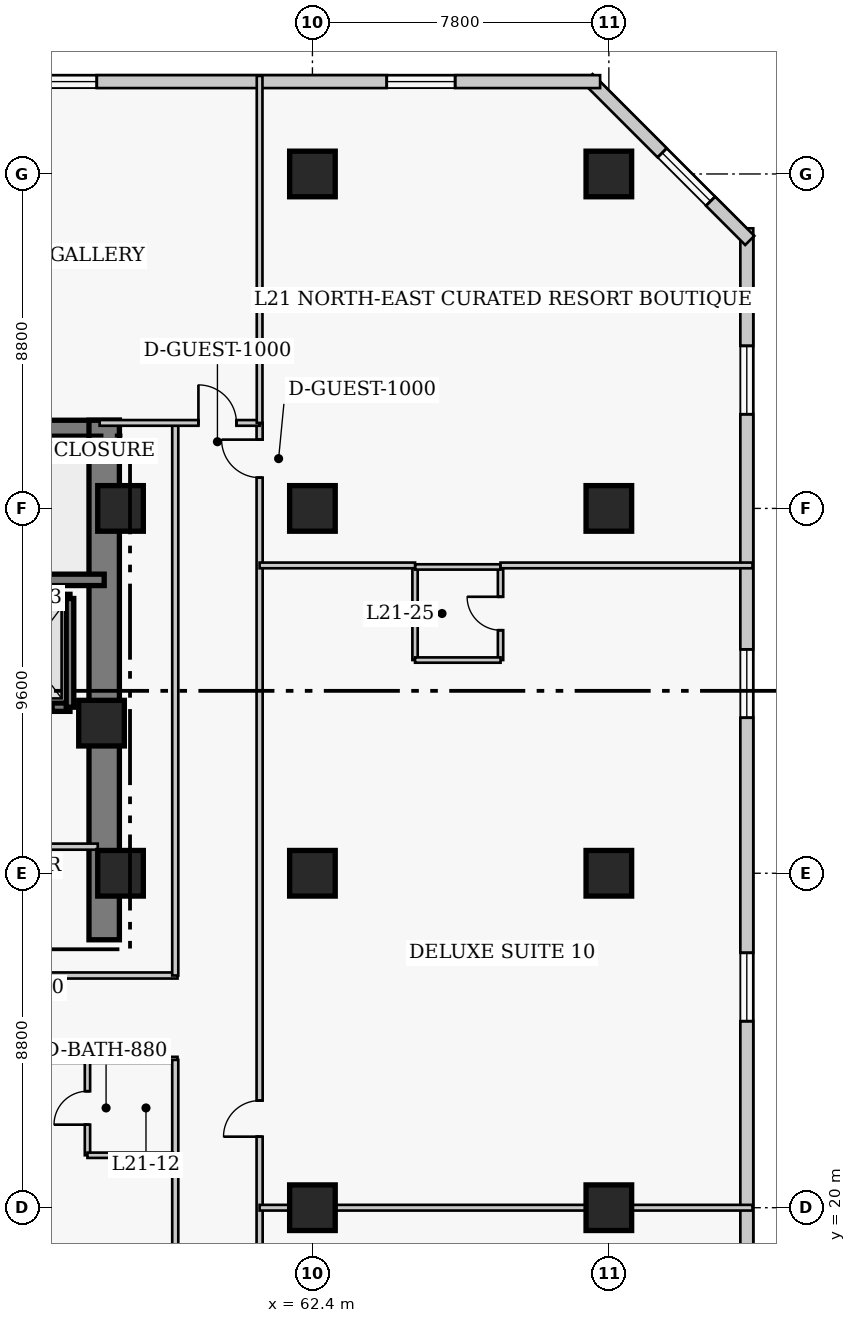
"""IFC4 building model, lengths in metres.
Left out: names, types, materials, properties, quantities, classifications, styles, units other than length and angle.
Written with IfcOpenShell. Run it as: python <this file> out.ifc"""

import sys

from ifc_helpers import new_model, si_unit, direction, frame, frame_2d, origin, origin_2d, place, context, subcontext, project, spatial, rectangle, extrude, element, fill, save


model = new_model("IFC4")
c1 = context("Model", 3, precision=1e-05, world=origin(), true_north=direction((0.0, 1.0)))
c2 = subcontext(c1, "Body", "Model", "MODEL_VIEW")
j1 = project(units=[si_unit("LENGTHUNIT", "METRE"), si_unit("PLANEANGLEUNIT", "RADIAN")], contexts=[c1])
p1 = place(None, origin())
s1 = spatial("IfcSite", under=j1, at=p1, CompositionType="ELEMENT")
p2 = place(p1, origin())
s2 = spatial("IfcBuilding", under=s1, at=p2, CompositionType="ELEMENT")
p3 = place(p2, frame((0.0, 0.0, 88.0)))
s3 = spatial("IfcBuildingStorey", under=s2, at=p3, CompositionType="ELEMENT", Elevation=88.0)
p4 = place(p3, frame((48.45, 40.32, 0.0), z_axis=(0.0, 0.0, 1.0), x_axis=(1.0, 0.0, 0.0)))
e1 = element("IfcWall", 1, at=p4, inside=s3, PredefinedType="SHEAR", context=c2, shape_type="SweptSolid", body=[
    extrude(rectangle(XDim=8.87, YDim=0.8, at=frame_2d((4.435, 0.0))), origin(), (0.0, 0.0, 1.0), 3.8),
])
p5 = place(p3, frame((56.92, 27.05, 0.0), z_axis=(0.0, 0.0, 1.0), x_axis=(0.0, 1.0, 0.0)))
e2 = element("IfcWall", 2, at=p5, inside=s3, PredefinedType="SHEAR", context=c2, shape_type="SweptSolid", body=[
    extrude(rectangle(XDim=13.67, YDim=0.8, at=frame_2d((6.835, 0.0))), origin(), (0.0, 0.0, 1.0), 3.8),
])
p6 = place(p3, frame((48.45, 36.52, 0.0), z_axis=(0.0, 0.0, 1.0), x_axis=(1.0, 0.0, 0.0)))
e3 = element("IfcWall", 3, at=p6, inside=s3, PredefinedType="SHEAR", context=c2, shape_type="SweptSolid", body=[
    extrude(rectangle(XDim=8.47, YDim=0.3, at=frame_2d((4.235, 0.0))), origin(), (0.0, 0.0, 1.0), 3.8),
])
for number, where, z_axis, x_axis in (
    (4, (62.4, 20.0, 0.0), (0.0, 0.0, 1.0), (1.0, 0.0, 0.0)),
    (5, (62.4, 28.8, 0.0), (0.0, 0.0, 1.0), (1.0, 0.0, 0.0)),
    (6, (62.4, 38.4, 0.0), (0.0, 0.0, 1.0), (1.0, 0.0, 0.0)),
    (7, (62.4, 47.2, 0.0), (0.0, 0.0, 1.0), (1.0, 0.0, 0.0)),
    (8, (70.2, 20.0, 0.0), (0.0, 0.0, 1.0), (1.0, 0.0, 0.0)),
    (9, (70.2, 28.8, 0.0), (0.0, 0.0, 1.0), (1.0, 0.0, 0.0)),
    (10, (70.2, 38.4, 0.0), (0.0, 0.0, 1.0), (1.0, 0.0, 0.0)),
    (11, (70.2, 47.2, 0.0), (0.0, 0.0, 1.0), (1.0, 0.0, 0.0)),
    (12, (57.35, 28.8, 0.0), (0.0, 0.0, 1.0), (1.0, 0.0, 0.0)),
    (13, (57.35, 38.4, 0.0), (0.0, 0.0, 1.0), (1.0, 0.0, 0.0)),
    (14, (56.85, 32.75, 0.0), (0.0, 0.0, 1.0), (1.0, 0.0, 0.0)),
):
    element("IfcColumn", number, at=place(p3, frame(where, z_axis=z_axis, x_axis=x_axis)), inside=s3, PredefinedType="COLUMN", context=c2, shape_type="SweptSolid", body=[
        extrude(rectangle(XDim=1.2, YDim=1.2, at=origin_2d()), origin(), (0.0, 0.0, 1.0), 3.8),
    ])
p7 = place(p3, frame((73.83, 13.83, 0.0), z_axis=(0.0, 0.0, 1.0), x_axis=(0.0, 1.0, 0.0)))
e15 = element("IfcWall", 15, at=p7, inside=s3, PredefinedType="SOLIDWALL", context=c2, shape_type="SweptSolid", body=[
    extrude(rectangle(XDim=31.94, YDim=0.34, at=frame_2d((15.97, 0.0))), origin(), (0.0, 0.0, 1.0), 3.54),
])
p8 = place(p7, frame((3.093, 0.0, 0.85)))
e16 = element("IfcOpeningElement", 16, at=p8, cuts=e15, PredefinedType="OPENING", context=c2, shape_type="SweptSolid", body=[
    extrude(rectangle(XDim=1.8, YDim=1.8, at=frame_2d((0.9, 0.9))), frame((0.0, 0.18, 0.0), z_axis=(0.0, -1.0, 0.0), x_axis=(1.0, 0.0, 0.0)), (0.0, 0.0, 1.0), 0.36),
])
p9 = place(p7, frame((11.077, 0.0, 0.85)))
e17 = element("IfcOpeningElement", 17, at=p9, cuts=e15, PredefinedType="OPENING", context=c2, shape_type="SweptSolid", body=[
    extrude(rectangle(XDim=1.8, YDim=1.8, at=frame_2d((0.9, 0.9))), frame((0.0, 0.18, 0.0), z_axis=(0.0, -1.0, 0.0), x_axis=(1.0, 0.0, 0.0)), (0.0, 0.0, 1.0), 0.36),
])
p10 = place(p7, frame((19.062, 0.0, 0.85)))
e18 = element("IfcOpeningElement", 18, at=p10, cuts=e15, PredefinedType="OPENING", context=c2, shape_type="SweptSolid", body=[
    extrude(rectangle(XDim=1.8, YDim=1.8, at=frame_2d((0.9, 0.9))), frame((0.0, 0.18, 0.0), z_axis=(0.0, -1.0, 0.0), x_axis=(1.0, 0.0, 0.0)), (0.0, 0.0, 1.0), 0.36),
])
p11 = place(p7, frame((27.048, 0.0, 0.85)))
e19 = element("IfcOpeningElement", 19, at=p11, cuts=e15, PredefinedType="OPENING", context=c2, shape_type="SweptSolid", body=[
    extrude(rectangle(XDim=1.8, YDim=1.8, at=frame_2d((0.9, 0.9))), frame((0.0, 0.18, 0.0), z_axis=(0.0, -1.0, 0.0), x_axis=(1.0, 0.0, 0.0)), (0.0, 0.0, 1.0), 0.36),
])
p12 = place(p3, frame((73.908, 45.451, 0.0), z_axis=(0.0, 0.0, 1.0), x_axis=(-0.707106781187, 0.707106781187, 0.0)))
e20 = element("IfcWall", 20, at=p12, inside=s3, PredefinedType="SOLIDWALL", context=c2, shape_type="SweptSolid", body=[
    extrude(rectangle(XDim=6.02, YDim=0.34, at=frame_2d((3.01, 0.0))), origin(), (0.0, 0.0, 1.0), 3.54),
])
p13 = place(p12, frame((1.46, 0.0, 0.85)))
e21 = element("IfcOpeningElement", 21, at=p13, cuts=e20, PredefinedType="OPENING", context=c2, shape_type="SweptSolid", body=[
    extrude(rectangle(XDim=1.8, YDim=1.8, at=frame_2d((0.9, 0.9))), frame((0.0, 0.18, 0.0), z_axis=(0.0, -1.0, 0.0), x_axis=(1.0, 0.0, 0.0)), (0.0, 0.0, 1.0), 0.36),
])
p14 = place(p3, frame((69.97, 49.63, 0.0), z_axis=(0.0, 0.0, 1.0), x_axis=(-1.0, 0.0, 0.0)))
e22 = element("IfcWall", 22, at=p14, inside=s3, PredefinedType="SOLIDWALL", context=c2, shape_type="SweptSolid", body=[
    extrude(rectangle(XDim=28.29, YDim=0.34, at=frame_2d((14.145, 0.0))), origin(), (0.0, 0.0, 1.0), 3.54),
])
p15 = place(p14, frame((3.815, 0.0, 0.85)))
e23 = element("IfcOpeningElement", 23, at=p15, cuts=e22, PredefinedType="OPENING", context=c2, shape_type="SweptSolid", body=[
    extrude(rectangle(XDim=1.8, YDim=1.8, at=frame_2d((0.9, 0.9))), frame((0.0, 0.18, 0.0), z_axis=(0.0, -1.0, 0.0), x_axis=(1.0, 0.0, 0.0)), (0.0, 0.0, 1.0), 0.36),
])
p16 = place(p14, frame((13.245, 0.0, 0.85)))
e24 = element("IfcOpeningElement", 24, at=p16, cuts=e22, PredefinedType="OPENING", context=c2, shape_type="SweptSolid", body=[
    extrude(rectangle(XDim=1.8, YDim=1.8, at=frame_2d((0.9, 0.9))), frame((0.0, 0.18, 0.0), z_axis=(0.0, -1.0, 0.0), x_axis=(1.0, 0.0, 0.0)), (0.0, 0.0, 1.0), 0.36),
])
p17 = place(p14, frame((22.675, 0.0, 0.85)))
e25 = element("IfcOpeningElement", 25, at=p17, cuts=e22, PredefinedType="OPENING", context=c2, shape_type="SweptSolid", body=[
    extrude(rectangle(XDim=1.8, YDim=1.8, at=frame_2d((0.9, 0.9))), frame((0.0, 0.18, 0.0), z_axis=(0.0, -1.0, 0.0), x_axis=(1.0, 0.0, 0.0)), (0.0, 0.0, 1.0), 0.36),
])
p18 = place(p3, frame((53.6, 36.03, 0.0), z_axis=(0.0, 0.0, 1.0), x_axis=(1.0, 0.0, 0.0)))
e26 = element("IfcWall", 26, at=p18, inside=s3, PredefinedType="SHEAR", context=c2, shape_type="SweptSolid", body=[
    extrude(rectangle(XDim=2.42, YDim=0.22, at=frame_2d((1.21, 0.0))), origin(), (0.0, 0.0, 1.0), 3.8),
])
p19 = place(p3, frame((53.6, 33.17, 0.0), z_axis=(0.0, 0.0, 1.0), x_axis=(1.0, 0.0, 0.0)))
e27 = element("IfcWall", 27, at=p19, inside=s3, PredefinedType="SHEAR", context=c2, shape_type="SweptSolid", body=[
    extrude(rectangle(XDim=2.42, YDim=0.22, at=frame_2d((1.21, 0.0))), origin(), (0.0, 0.0, 1.0), 3.8),
])
p20 = place(p19, frame((0.65, 0.0, 0.0)))
e28 = element("IfcOpeningElement", 28, at=p20, cuts=e27, PredefinedType="OPENING", context=c2, shape_type="SweptSolid", body=[
    extrude(rectangle(XDim=1.3, YDim=2.15, at=frame_2d((0.65, 1.075))), frame((0.0, 0.12, 0.0), z_axis=(0.0, -1.0, 0.0), x_axis=(1.0, 0.0, 0.0)), (0.0, 0.0, 1.0), 0.24),
])
p21 = place(p3, frame((56.02, 33.17, 0.0), z_axis=(0.0, 0.0, 1.0), x_axis=(0.0, 1.0, 0.0)))
e29 = element("IfcWall", 29, at=p21, inside=s3, PredefinedType="SHEAR", context=c2, shape_type="SweptSolid", body=[
    extrude(rectangle(XDim=2.86, YDim=0.2, at=frame_2d((1.43, 0.0))), origin(), (0.0, 0.0, 1.0), 3.8),
])
p22 = place(p3, frame((51.12, 29.5, 0.0), z_axis=(0.0, 0.0, 1.0), x_axis=(1.0, 0.0, 0.0)))
e30 = element("IfcWall", 30, at=p22, inside=s3, PredefinedType="PARTITIONING", context=c2, shape_type="SweptSolid", body=[
    extrude(rectangle(XDim=5.63, YDim=0.16, at=frame_2d((2.815, 0.0))), origin(), (0.0, 0.0, 1.0), 3.54),
])
p23 = place(p3, frame((35.85, 26.11, 0.0), z_axis=(0.0, 0.0, 1.0), x_axis=(1.0, 0.0, 0.0)))
e31 = element("IfcWall", 31, at=p23, inside=s3, PredefinedType="PARTITIONING", context=c2, shape_type="SweptSolid", body=[
    extrude(rectangle(XDim=23.0, YDim=0.16, at=frame_2d((11.5, 0.0))), origin(), (0.0, 0.0, 1.0), 3.54),
])
p24 = place(p3, frame((35.8, 23.89, 0.0), z_axis=(0.0, 0.0, 1.0), x_axis=(1.0, 0.0, 0.0)))
e32 = element("IfcWall", 32, at=p24, inside=s3, PredefinedType="PARTITIONING", context=c2, shape_type="SweptSolid", body=[
    extrude(rectangle(XDim=23.05, YDim=0.16, at=frame_2d((11.525, 0.0))), origin(), (0.0, 0.0, 1.0), 3.54),
])
p25 = place(p24, frame((3.607, 0.0, 0.0)))
e33 = element("IfcOpeningElement", 33, at=p25, cuts=e32, PredefinedType="OPENING", context=c2, shape_type="SweptSolid", body=[
    extrude(rectangle(XDim=1.0, YDim=2.15, at=frame_2d((0.5, 1.075))), frame((0.0, 0.09, 0.0), z_axis=(0.0, -1.0, 0.0), x_axis=(1.0, 0.0, 0.0)), (0.0, 0.0, 1.0), 0.18),
])
p26 = place(p24, frame((10.415, 0.0, 0.0)))
e34 = element("IfcOpeningElement", 34, at=p26, cuts=e32, PredefinedType="OPENING", context=c2, shape_type="SweptSolid", body=[
    extrude(rectangle(XDim=0.95, YDim=2.1, at=frame_2d((0.475, 1.05))), frame((0.0, 0.09, 0.0), z_axis=(0.0, -1.0, 0.0), x_axis=(1.0, 0.0, 0.0)), (0.0, 0.0, 1.0), 0.18),
])
p27 = place(p24, frame((17.803, 0.0, 0.0)))
e35 = element("IfcOpeningElement", 35, at=p27, cuts=e32, PredefinedType="OPENING", context=c2, shape_type="SweptSolid", body=[
    extrude(rectangle(XDim=0.95, YDim=2.1, at=frame_2d((0.475, 1.05))), frame((0.0, 0.09, 0.0), z_axis=(0.0, -1.0, 0.0), x_axis=(1.0, 0.0, 0.0)), (0.0, 0.0, 1.0), 0.18),
])
p28 = place(p3, frame((61.01, 11.85, 0.0), z_axis=(0.0, 0.0, 1.0), x_axis=(0.0, 1.0, 0.0)))
e36 = element("IfcWall", 36, at=p28, inside=s3, PredefinedType="PARTITIONING", context=c2, shape_type="SweptSolid", body=[
    extrude(rectangle(XDim=28.8, YDim=0.16, at=frame_2d((14.4, 0.0))), origin(), (0.0, 0.0, 1.0), 3.54),
])
p29 = place(p28, frame((3.6, 0.0, 0.0)))
e37 = element("IfcOpeningElement", 37, at=p29, cuts=e36, PredefinedType="OPENING", context=c2, shape_type="SweptSolid", body=[
    extrude(rectangle(XDim=0.95, YDim=2.1, at=frame_2d((0.475, 1.05))), frame((0.0, 0.09, 0.0), z_axis=(0.0, -1.0, 0.0), x_axis=(1.0, 0.0, 0.0)), (0.0, 0.0, 1.0), 0.18),
])
p30 = place(p28, frame((10.019, 0.0, 0.0)))
e38 = element("IfcOpeningElement", 38, at=p30, cuts=e36, PredefinedType="OPENING", context=c2, shape_type="SweptSolid", body=[
    extrude(rectangle(XDim=0.95, YDim=2.1, at=frame_2d((0.475, 1.05))), frame((0.0, 0.09, 0.0), z_axis=(0.0, -1.0, 0.0), x_axis=(1.0, 0.0, 0.0)), (0.0, 0.0, 1.0), 0.18),
])
p31 = place(p28, frame((27.36, 0.0, 0.0)))
e39 = element("IfcOpeningElement", 39, at=p31, cuts=e36, PredefinedType="OPENING", context=c2, shape_type="SweptSolid", body=[
    extrude(rectangle(XDim=1.0, YDim=2.15, at=frame_2d((0.5, 1.075))), frame((0.0, 0.09, 0.0), z_axis=(0.0, -1.0, 0.0), x_axis=(1.0, 0.0, 0.0)), (0.0, 0.0, 1.0), 0.18),
])
p32 = place(p3, frame((58.79, 26.11, 0.0), z_axis=(0.0, 0.0, 1.0), x_axis=(0.0, 1.0, 0.0)))
e40 = element("IfcWall", 40, at=p32, inside=s3, PredefinedType="PARTITIONING", context=c2, shape_type="SweptSolid", body=[
    extrude(rectangle(XDim=14.54, YDim=0.16, at=frame_2d((7.27, 0.0))), origin(), (0.0, 0.0, 1.0), 3.54),
])
p33 = place(p3, frame((58.79, 11.85, 0.0), z_axis=(0.0, 0.0, 1.0), x_axis=(0.0, 1.0, 0.0)))
e41 = element("IfcWall", 41, at=p33, inside=s3, PredefinedType="PARTITIONING", context=c2, shape_type="SweptSolid", body=[
    extrude(rectangle(XDim=12.04, YDim=0.16, at=frame_2d((6.02, 0.0))), origin(), (0.0, 0.0, 1.0), 3.54),
])
p34 = place(p3, frame((56.8, 40.65, 0.0), z_axis=(0.0, 0.0, 1.0), x_axis=(1.0, 0.0, 0.0)))
e42 = element("IfcWall", 42, at=p34, inside=s3, PredefinedType="PARTITIONING", context=c2, shape_type="SweptSolid", body=[
    extrude(rectangle(XDim=4.21, YDim=0.15, at=frame_2d((2.105, 0.0))), origin(), (0.0, 0.0, 1.0), 3.54),
])
p35 = place(p34, frame((2.6, 0.0, 0.0)))
e43 = element("IfcOpeningElement", 43, at=p35, cuts=e42, PredefinedType="OPENING", context=c2, shape_type="SweptSolid", body=[
    extrude(rectangle(XDim=1.0, YDim=2.15, at=frame_2d((0.5, 1.075))), frame((0.0, 0.085, 0.0), z_axis=(0.0, -1.0, 0.0), x_axis=(1.0, 0.0, 0.0)), (0.0, 0.0, 1.0), 0.17),
])
p36 = place(p3, frame((61.01, 40.65, 0.0), z_axis=(0.0, 0.0, 1.0), x_axis=(0.0, 1.0, 0.0)))
e44 = element("IfcWall", 44, at=p36, inside=s3, PredefinedType="PARTITIONING", context=c2, shape_type="SweptSolid", body=[
    extrude(rectangle(XDim=9.13, YDim=0.15, at=frame_2d((4.565, 0.0))), origin(), (0.0, 0.0, 1.0), 3.54),
])
p37 = place(p3, frame((56.48, 21.38, 0.0), z_axis=(0.0, 0.0, 1.0), x_axis=(0.0, 1.0, 0.0)))
e45 = element("IfcWall", 45, at=p37, inside=s3, PredefinedType="PLUMBINGWALL", context=c2, shape_type="SweptSolid", body=[
    extrude(rectangle(XDim=2.49, YDim=0.14, at=frame_2d((1.245, 0.0))), origin(), (0.0, 0.0, 1.0), 3.54),
])
p38 = place(p37, frame((0.805, 0.0, 0.0)))
e46 = element("IfcOpeningElement", 46, at=p38, cuts=e45, PredefinedType="OPENING", context=c2, shape_type="SweptSolid", body=[
    extrude(rectangle(XDim=0.88, YDim=2.05, at=frame_2d((0.44, 1.025))), frame((0.0, 0.08, 0.0), z_axis=(0.0, -1.0, 0.0), x_axis=(1.0, 0.0, 0.0)), (0.0, 0.0, 1.0), 0.16),
])
p39 = place(p3, frame((56.48, 21.38, 0.0), z_axis=(0.0, 0.0, 1.0), x_axis=(1.0, 0.0, 0.0)))
e47 = element("IfcWall", 47, at=p39, inside=s3, PredefinedType="PLUMBINGWALL", context=c2, shape_type="SweptSolid", body=[
    extrude(rectangle(XDim=2.25, YDim=0.14, at=frame_2d((1.125, 0.0))), origin(), (0.0, 0.0, 1.0), 3.54),
])
p40 = place(p3, frame((61.01, 20.0, 0.0), z_axis=(0.0, 0.0, 1.0), x_axis=(1.0, 0.0, 0.0)))
e48 = element("IfcWall", 48, at=p40, inside=s3, PredefinedType="PARTITIONING", context=c2, shape_type="SweptSolid", body=[
    extrude(rectangle(XDim=12.97, YDim=0.15, at=frame_2d((6.485, 0.0))), origin(), (0.0, 0.0, 1.0), 2.679),
])
p41 = place(p3, frame((65.1, 34.41, 0.0), z_axis=(0.0, 0.0, 1.0), x_axis=(0.0, 1.0, 0.0)))
e49 = element("IfcWall", 49, at=p41, inside=s3, PredefinedType="PLUMBINGWALL", context=c2, shape_type="SweptSolid", body=[
    extrude(rectangle(XDim=2.45, YDim=0.14, at=frame_2d((1.225, 0.0))), origin(), (0.0, 0.0, 1.0), 3.54),
])
p42 = place(p3, frame((67.35, 34.41, 0.0), z_axis=(0.0, 0.0, 1.0), x_axis=(0.0, 1.0, 0.0)))
e50 = element("IfcWall", 50, at=p42, inside=s3, PredefinedType="PLUMBINGWALL", context=c2, shape_type="SweptSolid", body=[
    extrude(rectangle(XDim=2.45, YDim=0.14, at=frame_2d((1.225, 0.0))), origin(), (0.0, 0.0, 1.0), 3.54),
])
p43 = place(p42, frame((0.785, 0.0, 0.0)))
e51 = element("IfcOpeningElement", 51, at=p43, cuts=e50, PredefinedType="OPENING", context=c2, shape_type="SweptSolid", body=[
    extrude(rectangle(XDim=0.88, YDim=2.05, at=frame_2d((0.44, 1.025))), frame((0.0, 0.08, 0.0), z_axis=(0.0, -1.0, 0.0), x_axis=(1.0, 0.0, 0.0)), (0.0, 0.0, 1.0), 0.16),
])
for number, where, z_axis, x_axis in (
    (52, (65.1, 34.41, 0.0), (0.0, 0.0, 1.0), (1.0, 0.0, 0.0)),
    (53, (65.1, 36.86, 0.0), (0.0, 0.0, 1.0), (1.0, 0.0, 0.0)),
):
    element("IfcWall", number, at=place(p3, frame(where, z_axis=z_axis, x_axis=x_axis)), inside=s3, PredefinedType="PLUMBINGWALL", context=c2, shape_type="SweptSolid", body=[
        extrude(rectangle(XDim=2.25, YDim=0.14, at=frame_2d((1.125, 0.0))), origin(), (0.0, 0.0, 1.0), 3.54),
    ])
p44 = place(p3, frame((61.01, 36.9, 0.0), z_axis=(0.0, 0.0, 1.0), x_axis=(1.0, 0.0, 0.0)))
e54 = element("IfcWall", 54, at=p44, inside=s3, PredefinedType="PARTITIONING", context=c2, shape_type="SweptSolid", body=[
    extrude(rectangle(XDim=4.09, YDim=0.15, at=frame_2d((2.045, 0.0))), origin(), (0.0, 0.0, 1.0), 3.54),
])
p45 = place(p3, frame((67.35, 36.9, 0.0), z_axis=(0.0, 0.0, 1.0), x_axis=(1.0, 0.0, 0.0)))
e55 = element("IfcWall", 55, at=p45, inside=s3, PredefinedType="PARTITIONING", context=c2, shape_type="SweptSolid", body=[
    extrude(rectangle(XDim=6.63, YDim=0.15, at=frame_2d((3.315, 0.0))), origin(), (0.0, 0.0, 1.0), 3.54),
])
p46 = place(p9, origin())
e56 = element("IfcWindow", 56, at=p46, inside=s3, PartitioningType="SINGLE_PANEL", PredefinedType="WINDOW", context=c2, shape_type="SweptSolid", body=[
    extrude(rectangle(XDim=1.8, YDim=1.8, at=frame_2d((0.9, 0.9))), frame((0.0, 0.03, 0.0), z_axis=(0.0, -1.0, 0.0), x_axis=(1.0, 0.0, 0.0)), (0.0, 0.0, 1.0), 0.06),
])
fill(e17, e56)
p47 = place(p10, origin())
e57 = element("IfcWindow", 57, at=p47, inside=s3, PartitioningType="SINGLE_PANEL", PredefinedType="WINDOW", context=c2, shape_type="SweptSolid", body=[
    extrude(rectangle(XDim=1.8, YDim=1.8, at=frame_2d((0.9, 0.9))), frame((0.0, 0.03, 0.0), z_axis=(0.0, -1.0, 0.0), x_axis=(1.0, 0.0, 0.0)), (0.0, 0.0, 1.0), 0.06),
])
fill(e18, e57)
p48 = place(p11, origin())
e58 = element("IfcWindow", 58, at=p48, inside=s3, PartitioningType="SINGLE_PANEL", PredefinedType="WINDOW", context=c2, shape_type="SweptSolid", body=[
    extrude(rectangle(XDim=1.8, YDim=1.8, at=frame_2d((0.9, 0.9))), frame((0.0, 0.03, 0.0), z_axis=(0.0, -1.0, 0.0), x_axis=(1.0, 0.0, 0.0)), (0.0, 0.0, 1.0), 0.06),
])
fill(e19, e58)
p49 = place(p13, origin())
e59 = element("IfcWindow", 59, at=p49, inside=s3, PartitioningType="SINGLE_PANEL", PredefinedType="WINDOW", context=c2, shape_type="SweptSolid", body=[
    extrude(rectangle(XDim=1.8, YDim=1.8, at=frame_2d((0.9, 0.9))), frame((0.0, 0.03, 0.0), z_axis=(0.0, -1.0, 0.0), x_axis=(1.0, 0.0, 0.0)), (0.0, 0.0, 1.0), 0.06),
])
fill(e21, e59)
p50 = place(p15, origin())
e60 = element("IfcWindow", 60, at=p50, inside=s3, PartitioningType="SINGLE_PANEL", PredefinedType="WINDOW", context=c2, shape_type="SweptSolid", body=[
    extrude(rectangle(XDim=1.8, YDim=1.8, at=frame_2d((0.9, 0.9))), frame((0.0, 0.03, 0.0), z_axis=(0.0, -1.0, 0.0), x_axis=(1.0, 0.0, 0.0)), (0.0, 0.0, 1.0), 0.06),
])
fill(e23, e60)
p51 = place(p16, origin())
e61 = element("IfcWindow", 61, at=p51, inside=s3, PartitioningType="SINGLE_PANEL", PredefinedType="WINDOW", context=c2, shape_type="SweptSolid", body=[
    extrude(rectangle(XDim=1.8, YDim=1.8, at=frame_2d((0.9, 0.9))), frame((0.0, 0.03, 0.0), z_axis=(0.0, -1.0, 0.0), x_axis=(1.0, 0.0, 0.0)), (0.0, 0.0, 1.0), 0.06),
])
fill(e24, e61)
p52 = place(p35, origin())
e62 = element("IfcDoor", 62, at=p52, inside=s3, OperationType="SINGLE_SWING_LEFT", PredefinedType="DOOR", context=c2, shape_type="SweptSolid", body=[
    extrude(rectangle(XDim=1.0, YDim=2.15, at=frame_2d((0.5, 1.075))), frame((0.0, 0.025, 0.0), z_axis=(0.0, -1.0, 0.0), x_axis=(1.0, 0.0, 0.0)), (0.0, 0.0, 1.0), 0.05),
])
fill(e43, e62)
p53 = place(p38, origin())
e63 = element("IfcDoor", 63, at=p53, inside=s3, OperationType="SINGLE_SWING_LEFT", PredefinedType="DOOR", context=c2, shape_type="SweptSolid", body=[
    extrude(rectangle(XDim=0.88, YDim=2.05, at=frame_2d((0.44, 1.025))), frame((0.0, 0.025, 0.0), z_axis=(0.0, -1.0, 0.0), x_axis=(1.0, 0.0, 0.0)), (0.0, 0.0, 1.0), 0.05),
])
fill(e46, e63)
p54 = place(p43, origin())
e64 = element("IfcDoor", 64, at=p54, inside=s3, OperationType="SINGLE_SWING_RIGHT", PredefinedType="DOOR", context=c2, shape_type="SweptSolid", body=[
    extrude(rectangle(XDim=0.88, YDim=2.05, at=frame_2d((0.44, 1.025))), frame((0.0, 0.025, 0.0), z_axis=(0.0, -1.0, 0.0), x_axis=(1.0, 0.0, 0.0)), (0.0, 0.0, 1.0), 0.05),
])
fill(e51, e64)
p55 = place(p30, origin())
e65 = element("IfcDoor", 65, at=p55, inside=s3, OperationType="SINGLE_SWING_LEFT", PredefinedType="DOOR", context=c2, shape_type="SweptSolid", body=[
    extrude(rectangle(XDim=0.95, YDim=2.1, at=frame_2d((0.475, 1.05))), frame((0.0, 0.025, 0.0), z_axis=(0.0, -1.0, 0.0), x_axis=(1.0, 0.0, 0.0)), (0.0, 0.0, 1.0), 0.05),
])
fill(e38, e65)
p56 = place(p31, origin())
e66 = element("IfcDoor", 66, at=p56, inside=s3, OperationType="SINGLE_SWING_RIGHT", PredefinedType="DOOR", context=c2, shape_type="SweptSolid", body=[
    extrude(rectangle(XDim=1.0, YDim=2.15, at=frame_2d((0.5, 1.075))), frame((0.0, 0.025, 0.0), z_axis=(0.0, -1.0, 0.0), x_axis=(1.0, 0.0, 0.0)), (0.0, 0.0, 1.0), 0.05),
])
fill(e39, e66)
save(model, sys.argv[1])
